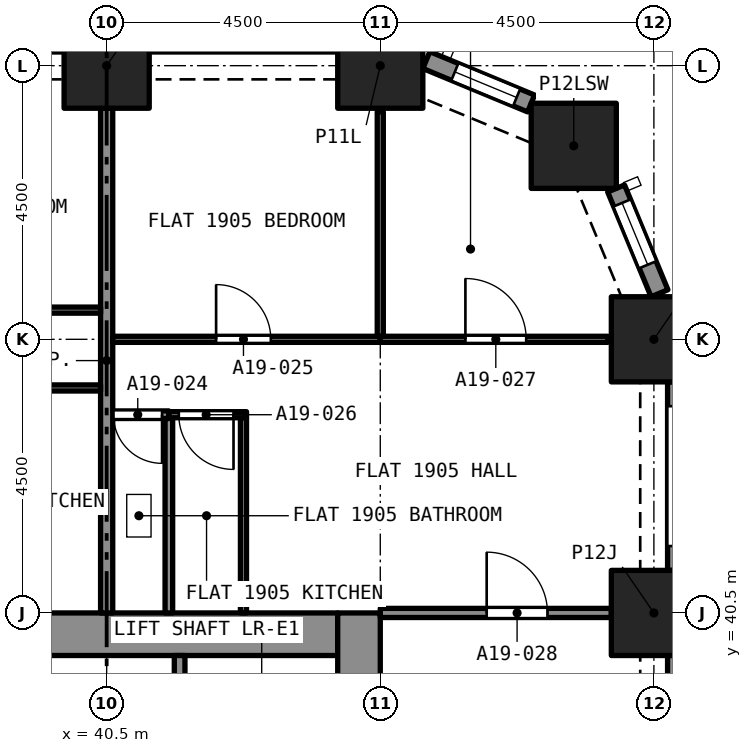
"""IFC4 building model, lengths in metres.
Left out: names, types, materials, properties, quantities, classifications, styles, units other than length and angle.
Written with IfcOpenShell. Run it as: python <this file> out.ifc"""

import sys

from ifc_helpers import new_model, si_unit, direction, frame, frame_2d, origin, origin_2d, place, context, subcontext, project, spatial, rectangle, extrude, element, fill, save


model = new_model("IFC4")
c1 = context("Model", 3, precision=1e-05, world=origin(), true_north=direction((0.0, 1.0)))
c2 = subcontext(c1, "Body", "Model", "MODEL_VIEW")
j1 = project(units=[si_unit("LENGTHUNIT", "METRE"), si_unit("PLANEANGLEUNIT", "RADIAN")], contexts=[c1])
p1 = place(None, origin())
s1 = spatial("IfcSite", under=j1, at=p1, CompositionType="ELEMENT")
p2 = place(p1, origin())
s2 = spatial("IfcBuilding", under=s1, at=p2, CompositionType="ELEMENT")
p3 = place(p2, frame((0.0, 0.0, 72.0)))
s3 = spatial("IfcBuildingStorey", under=s2, at=p3, CompositionType="ELEMENT", Elevation=72.0)
for number, where, z_axis, x_axis in (
    (1, (49.5, 40.5, 0.0), (0.0, 0.0, 1.0), (1.0, 0.0, 0.0)),
    (2, (49.5, 45.0, 0.0), (0.0, 0.0, 1.0), (1.0, 0.0, 0.0)),
    (3, (48.182, 48.182, 0.0), (0.0, 0.0, 1.0), (1.0, 0.0, 0.0)),
    (4, (40.5, 49.5, 0.0), (0.0, 0.0, 1.0), (1.0, 0.0, 0.0)),
    (5, (45.0, 49.5, 0.0), (0.0, 0.0, 1.0), (1.0, 0.0, 0.0)),
):
    element("IfcColumn", number, at=place(p3, frame(where, z_axis=z_axis, x_axis=x_axis)), inside=s3, PredefinedType="COLUMN", context=c2, shape_type="SweptSolid", body=[
        extrude(rectangle(XDim=1.4, YDim=1.4, at=origin_2d()), origin(), (0.0, 0.0, 1.0), 3.2),
    ])
p4 = place(p3, frame((36.7, 40.15, 0.0), z_axis=(0.0, 0.0, 1.0), x_axis=(1.0, 0.0, 0.0)))
e6 = element("IfcWall", 6, at=p4, inside=s3, PredefinedType="SOLIDWALL", context=c2, shape_type="SweptSolid", body=[
    extrude(rectangle(XDim=7.6, YDim=0.7, at=frame_2d((3.8, 0.0))), origin(), (0.0, 0.0, 1.0), 3.2),
])
p5 = place(p3, frame((44.65, 27.0, 0.0), z_axis=(0.0, 0.0, 1.0), x_axis=(0.0, 1.0, 0.0)))
e7 = element("IfcWall", 7, at=p5, inside=s3, PredefinedType="SOLIDWALL", context=c2, shape_type="SweptSolid", body=[
    extrude(rectangle(XDim=13.5, YDim=0.7, at=frame_2d((6.75, 0.0))), origin(), (0.0, 0.0, 1.0), 3.2),
])
p6 = place(p5, frame((8.95, 0.0, 0.0)))
e8 = element("IfcOpeningElement", 8, at=p6, cuts=e7, PredefinedType="OPENING", context=c2, shape_type="SweptSolid", body=[
    extrude(rectangle(XDim=1.2, YDim=2.1, at=frame_2d((0.6, 1.05))), frame((0.0, 0.36, 0.0), z_axis=(0.0, -1.0, 0.0), x_axis=(1.0, 0.0, 0.0)), (0.0, 0.0, 1.0), 0.72),
])
p7 = place(p3, frame((49.875, 39.8, 0.0), z_axis=(0.0, 0.0, 1.0), x_axis=(0.0, -1.0, 0.0)))
e9 = element("IfcWall", 9, at=p7, inside=s3, PredefinedType="SOLIDWALL", context=c2, shape_type="SweptSolid", body=[
    extrude(rectangle(XDim=3.1, YDim=0.3, at=frame_2d((1.55, 0.0))), origin(), (0.0, 0.0, 1.0), 3.2),
])
p8 = place(p7, frame((0.4, 0.0, 0.45)))
e10 = element("IfcOpeningElement", 10, at=p8, cuts=e9, PredefinedType="OPENING", context=c2, shape_type="SweptSolid", body=[
    extrude(rectangle(XDim=2.3, YDim=1.95, at=frame_2d((1.15, 0.975))), frame((0.0, 0.16, 0.0), z_axis=(0.0, -1.0, 0.0), x_axis=(1.0, 0.0, 0.0)), (0.0, 0.0, 1.0), 0.32),
])
p9 = place(p3, frame((49.875, 44.3, 0.0), z_axis=(0.0, 0.0, 1.0), x_axis=(0.0, -1.0, 0.0)))
e11 = element("IfcWall", 11, at=p9, inside=s3, PredefinedType="SOLIDWALL", context=c2, shape_type="SweptSolid", body=[
    extrude(rectangle(XDim=3.1, YDim=0.3, at=frame_2d((1.55, 0.0))), origin(), (0.0, 0.0, 1.0), 3.2),
])
p10 = place(p9, frame((0.4, 0.0, 0.45)))
e12 = element("IfcOpeningElement", 12, at=p10, cuts=e11, PredefinedType="OPENING", context=c2, shape_type="SweptSolid", body=[
    extrude(rectangle(XDim=2.3, YDim=1.95, at=frame_2d((1.15, 0.975))), frame((0.0, 0.16, 0.0), z_axis=(0.0, -1.0, 0.0), x_axis=(1.0, 0.0, 0.0)), (0.0, 0.0, 1.0), 0.32),
])
p11 = place(p3, frame((48.878, 47.48, 0.0), z_axis=(0.0, 0.0, 1.0), x_axis=(0.38262540684, -0.923903565336, 0.0)))
e13 = element("IfcWall", 13, at=p11, inside=s3, PredefinedType="SOLIDWALL", context=c2, shape_type="SweptSolid", body=[
    extrude(rectangle(XDim=1.865, YDim=0.3, at=frame_2d((0.933, 0.0))), origin(), (0.0, 0.0, 1.0), 3.2),
])
p12 = place(p11, frame((0.258, 0.0, 0.45)))
e14 = element("IfcOpeningElement", 14, at=p12, cuts=e13, PredefinedType="OPENING", context=c2, shape_type="SweptSolid", body=[
    extrude(rectangle(XDim=1.1, YDim=1.95, at=frame_2d((0.55, 0.975))), frame((0.0, 0.16, 0.0), z_axis=(0.0, -1.0, 0.0), x_axis=(1.0, 0.0, 0.0)), (0.0, 0.0, 1.0), 0.32),
])
p13 = place(p3, frame((45.757, 49.592, 0.0), z_axis=(0.0, 0.0, 1.0), x_axis=(0.923857286003, -0.382737135771, 0.0)))
e15 = element("IfcWall", 15, at=p13, inside=s3, PredefinedType="SOLIDWALL", context=c2, shape_type="SweptSolid", body=[
    extrude(rectangle(XDim=1.865, YDim=0.3, at=frame_2d((0.933, 0.0))), origin(), (0.0, 0.0, 1.0), 3.2),
])
p14 = place(p13, frame((0.508, 0.0, 0.45)))
e16 = element("IfcOpeningElement", 16, at=p14, cuts=e15, PredefinedType="OPENING", context=c2, shape_type="SweptSolid", body=[
    extrude(rectangle(XDim=1.1, YDim=1.95, at=frame_2d((0.55, 0.975))), frame((0.0, 0.16, 0.0), z_axis=(0.0, -1.0, 0.0), x_axis=(1.0, 0.0, 0.0)), (0.0, 0.0, 1.0), 0.32),
])
p15 = place(p3, frame((41.523, 43.76, 0.0), z_axis=(0.0, 0.0, 1.0), x_axis=(-1.0, 0.0, 0.0)))
e17 = element("IfcWall", 17, at=p15, inside=s3, PredefinedType="PARTITIONING", context=c2, shape_type="SweptSolid", body=[
    extrude(rectangle(XDim=0.923, YDim=0.125, at=frame_2d((0.461, 0.0))), origin(), (0.0, 0.0, 1.0), 2.7),
])
p16 = place(p15, frame((0.111, 0.0, 0.0)))
e18 = element("IfcOpeningElement", 18, at=p16, cuts=e17, PredefinedType="OPENING", context=c2, shape_type="SweptSolid", body=[
    extrude(rectangle(XDim=0.8, YDim=2.1, at=frame_2d((0.4, 1.05))), frame((0.0, 0.073, 0.0), z_axis=(0.0, -1.0, 0.0), x_axis=(1.0, 0.0, 0.0)), (0.0, 0.0, 1.0), 0.145),
])
p17 = place(p3, frame((41.523, 40.5, 0.0), z_axis=(0.0, 0.0, 1.0), x_axis=(0.0, 1.0, 0.0)))
e19 = element("IfcWall", 19, at=p17, inside=s3, PredefinedType="PARTITIONING", context=c2, shape_type="SweptSolid", body=[
    extrude(rectangle(XDim=3.198, YDim=0.125, at=frame_2d((1.599, 0.0))), origin(), (0.0, 0.0, 1.0), 2.7),
])
p18 = place(p3, frame((40.5, 40.5, 0.0), z_axis=(0.0, 0.0, 1.0), x_axis=(0.0, 1.0, 0.0)))
e20 = element("IfcWall", 20, at=p18, inside=s3, PredefinedType="PARTITIONING", context=c2, shape_type="SweptSolid", body=[
    extrude(rectangle(XDim=8.3, YDim=0.2, at=frame_2d((4.15, 0.0))), origin(), (0.0, 0.0, 1.0), 2.7),
])
p19 = place(p3, frame((40.6, 45.0, 0.0), z_axis=(0.0, 0.0, 1.0), x_axis=(1.0, 0.0, 0.0)))
e21 = element("IfcWall", 21, at=p19, inside=s3, PredefinedType="PARTITIONING", context=c2, shape_type="SweptSolid", body=[
    extrude(rectangle(XDim=4.4, YDim=0.1, at=frame_2d((2.2, 0.0))), origin(), (0.0, 0.0, 1.0), 2.7),
])
p20 = place(p19, frame((1.7, 0.0, 0.0)))
e22 = element("IfcOpeningElement", 22, at=p20, cuts=e21, PredefinedType="OPENING", context=c2, shape_type="SweptSolid", body=[
    extrude(rectangle(XDim=0.9, YDim=2.1, at=frame_2d((0.45, 1.05))), frame((0.0, 0.06, 0.0), z_axis=(0.0, -1.0, 0.0), x_axis=(1.0, 0.0, 0.0)), (0.0, 0.0, 1.0), 0.12),
])
p21 = place(p3, frame((45.0, 45.05, 0.0), z_axis=(0.0, 0.0, 1.0), x_axis=(0.0, 1.0, 0.0)))
e23 = element("IfcWall", 23, at=p21, inside=s3, PredefinedType="PARTITIONING", context=c2, shape_type="SweptSolid", body=[
    extrude(rectangle(XDim=3.692, YDim=0.1, at=frame_2d((1.846, 0.0))), origin(), (0.0, 0.0, 1.0), 2.7),
])
p22 = place(p3, frame((42.75, 40.5, 0.0), z_axis=(0.0, 0.0, 1.0), x_axis=(0.0, 1.0, 0.0)))
e24 = element("IfcWall", 24, at=p22, inside=s3, PredefinedType="PARTITIONING", context=c2, shape_type="SweptSolid", body=[
    extrude(rectangle(XDim=3.21, YDim=0.1, at=frame_2d((1.605, 0.0))), origin(), (0.0, 0.0, 1.0), 2.7),
])
p23 = place(p3, frame((42.8, 43.76, 0.0), z_axis=(0.0, 0.0, 1.0), x_axis=(-1.0, 0.0, 0.0)))
e25 = element("IfcWall", 25, at=p23, inside=s3, PredefinedType="PARTITIONING", context=c2, shape_type="SweptSolid", body=[
    extrude(rectangle(XDim=1.277, YDim=0.1, at=frame_2d((0.639, 0.0))), origin(), (0.0, 0.0, 1.0), 2.7),
])
p24 = place(p23, frame((0.214, 0.0, 0.0)))
e26 = element("IfcOpeningElement", 26, at=p24, cuts=e25, PredefinedType="OPENING", context=c2, shape_type="SweptSolid", body=[
    extrude(rectangle(XDim=0.9, YDim=2.1, at=frame_2d((0.45, 1.05))), frame((0.0, 0.06, 0.0), z_axis=(0.0, -1.0, 0.0), x_axis=(1.0, 0.0, 0.0)), (0.0, 0.0, 1.0), 0.12),
])
p25 = place(p3, frame((45.0, 45.0, 0.0), z_axis=(0.0, 0.0, 1.0), x_axis=(1.0, 0.0, 0.0)))
e27 = element("IfcWall", 27, at=p25, inside=s3, PredefinedType="PARTITIONING", context=c2, shape_type="SweptSolid", body=[
    extrude(rectangle(XDim=3.742, YDim=0.1, at=frame_2d((1.871, 0.0))), origin(), (0.0, 0.0, 1.0), 2.7),
])
p26 = place(p25, frame((1.4, 0.0, 0.0)))
e28 = element("IfcOpeningElement", 28, at=p26, cuts=e27, PredefinedType="OPENING", context=c2, shape_type="SweptSolid", body=[
    extrude(rectangle(XDim=1.0, YDim=2.1, at=frame_2d((0.5, 1.05))), frame((0.0, 0.06, 0.0), z_axis=(0.0, -1.0, 0.0), x_axis=(1.0, 0.0, 0.0)), (0.0, 0.0, 1.0), 0.12),
])
p27 = place(p3, frame((45.0, 40.5, 0.0), z_axis=(0.0, 0.0, 1.0), x_axis=(1.0, 0.0, 0.0)))
e29 = element("IfcWall", 29, at=p27, inside=s3, PredefinedType="PARTITIONING", context=c2, shape_type="SweptSolid", body=[
    extrude(rectangle(XDim=3.8, YDim=0.15, at=frame_2d((1.9, 0.0))), origin(), (0.0, 0.0, 1.0), 2.7),
])
p28 = place(p27, frame((1.75, 0.0, 0.0)))
e30 = element("IfcOpeningElement", 30, at=p28, cuts=e29, PredefinedType="OPENING", context=c2, shape_type="SweptSolid", body=[
    extrude(rectangle(XDim=1.0, YDim=2.1, at=frame_2d((0.5, 1.05))), frame((0.0, 0.085, 0.0), z_axis=(0.0, -1.0, 0.0), x_axis=(1.0, 0.0, 0.0)), (0.0, 0.0, 1.0), 0.17),
])
p29 = place(p3, frame((36.0, 45.48, 0.0), z_axis=(0.0, 0.0, 1.0), x_axis=(1.0, 0.0, 0.0)))
e31 = element("IfcWall", 31, at=p29, inside=s3, PredefinedType="PARTITIONING", context=c2, shape_type="SweptSolid", body=[
    extrude(rectangle(XDim=4.4, YDim=0.1, at=frame_2d((2.2, 0.0))), origin(), (0.0, 0.0, 1.0), 2.7),
])
p30 = place(p29, frame((1.8, 0.0, 0.0)))
e32 = element("IfcOpeningElement", 32, at=p30, cuts=e31, PredefinedType="OPENING", context=c2, shape_type="SweptSolid", body=[
    extrude(rectangle(XDim=0.9, YDim=2.1, at=frame_2d((0.45, 1.05))), frame((0.0, 0.06, 0.0), z_axis=(0.0, -1.0, 0.0), x_axis=(1.0, 0.0, 0.0)), (0.0, 0.0, 1.0), 0.12),
])
p31 = place(p3, frame((40.4, 44.2, 0.0), z_axis=(0.0, 0.0, 1.0), x_axis=(-1.0, 0.0, 0.0)))
e33 = element("IfcWall", 33, at=p31, inside=s3, PredefinedType="PARTITIONING", context=c2, shape_type="SweptSolid", body=[
    extrude(rectangle(XDim=3.168, YDim=0.1, at=frame_2d((1.584, 0.0))), origin(), (0.0, 0.0, 1.0), 2.7),
])
p32 = place(p31, frame((1.084, 0.0, 0.0)))
e34 = element("IfcOpeningElement", 34, at=p32, cuts=e33, PredefinedType="OPENING", context=c2, shape_type="SweptSolid", body=[
    extrude(rectangle(XDim=0.9, YDim=2.1, at=frame_2d((0.45, 1.05))), frame((0.0, 0.06, 0.0), z_axis=(0.0, -1.0, 0.0), x_axis=(1.0, 0.0, 0.0)), (0.0, 0.0, 1.0), 0.12),
])
p33 = place(p3, frame((41.7, 37.5, 0.0), z_axis=(0.0, 0.0, 1.0), x_axis=(0.0, 1.0, 0.0)))
e35 = element("IfcWall", 35, at=p33, inside=s3, PredefinedType="SOLIDWALL", context=c2, shape_type="SweptSolid", body=[
    extrude(rectangle(XDim=2.3, YDim=0.175, at=frame_2d((1.15, 0.0))), origin(), (0.0, 0.0, 1.0), 2.7),
])
p34 = place(p12, origin())
e36 = element("IfcWindow", 36, at=p34, inside=s3, PartitioningType="SINGLE_PANEL", PredefinedType="WINDOW", context=c2, shape_type="SweptSolid", body=[
    extrude(rectangle(XDim=1.1, YDim=1.95, at=frame_2d((0.55, 0.975))), frame((0.0, 0.03, 0.0), z_axis=(0.0, -1.0, 0.0), x_axis=(1.0, 0.0, 0.0)), (0.0, 0.0, 1.0), 0.06),
])
fill(e14, e36)
p35 = place(p14, origin())
e37 = element("IfcWindow", 37, at=p35, inside=s3, PartitioningType="SINGLE_PANEL", PredefinedType="WINDOW", context=c2, shape_type="SweptSolid", body=[
    extrude(rectangle(XDim=1.1, YDim=1.95, at=frame_2d((0.55, 0.975))), frame((0.0, 0.03, 0.0), z_axis=(0.0, -1.0, 0.0), x_axis=(1.0, 0.0, 0.0)), (0.0, 0.0, 1.0), 0.06),
])
fill(e16, e37)
p36 = place(p16, origin())
e38 = element("IfcDoor", 38, at=p36, inside=s3, OperationType="SINGLE_SWING_RIGHT", PredefinedType="DOOR", context=c2, shape_type="SweptSolid", body=[
    extrude(rectangle(XDim=0.8, YDim=2.1, at=frame_2d((0.4, 1.05))), frame((0.0, 0.025, 0.0), z_axis=(0.0, -1.0, 0.0), x_axis=(1.0, 0.0, 0.0)), (0.0, 0.0, 1.0), 0.05),
])
fill(e18, e38)
p37 = place(p20, origin())
e39 = element("IfcDoor", 39, at=p37, inside=s3, OperationType="SINGLE_SWING_LEFT", PredefinedType="DOOR", context=c2, shape_type="SweptSolid", body=[
    extrude(rectangle(XDim=0.9, YDim=2.1, at=frame_2d((0.45, 1.05))), frame((0.0, 0.025, 0.0), z_axis=(0.0, -1.0, 0.0), x_axis=(1.0, 0.0, 0.0)), (0.0, 0.0, 1.0), 0.05),
])
fill(e22, e39)
p38 = place(p24, origin())
e40 = element("IfcDoor", 40, at=p38, inside=s3, OperationType="SINGLE_SWING_RIGHT", PredefinedType="DOOR", context=c2, shape_type="SweptSolid", body=[
    extrude(rectangle(XDim=0.9, YDim=2.1, at=frame_2d((0.45, 1.05))), frame((0.0, 0.025, 0.0), z_axis=(0.0, -1.0, 0.0), x_axis=(1.0, 0.0, 0.0)), (0.0, 0.0, 1.0), 0.05),
])
fill(e26, e40)
p39 = place(p26, origin())
e41 = element("IfcDoor", 41, at=p39, inside=s3, OperationType="SINGLE_SWING_RIGHT", PredefinedType="DOOR", context=c2, shape_type="SweptSolid", body=[
    extrude(rectangle(XDim=1.0, YDim=2.1, at=frame_2d((0.5, 1.05))), frame((0.0, 0.025, 0.0), z_axis=(0.0, -1.0, 0.0), x_axis=(1.0, 0.0, 0.0)), (0.0, 0.0, 1.0), 0.05),
])
fill(e28, e41)
p40 = place(p28, origin())
e42 = element("IfcDoor", 42, at=p40, inside=s3, OperationType="SINGLE_SWING_RIGHT", PredefinedType="DOOR", context=c2, shape_type="SweptSolid", body=[
    extrude(rectangle(XDim=1.0, YDim=2.1, at=frame_2d((0.5, 1.05))), frame((0.0, 0.025, 0.0), z_axis=(0.0, -1.0, 0.0), x_axis=(1.0, 0.0, 0.0)), (0.0, 0.0, 1.0), 0.05),
])
fill(e30, e42)
save(model, sys.argv[1])
